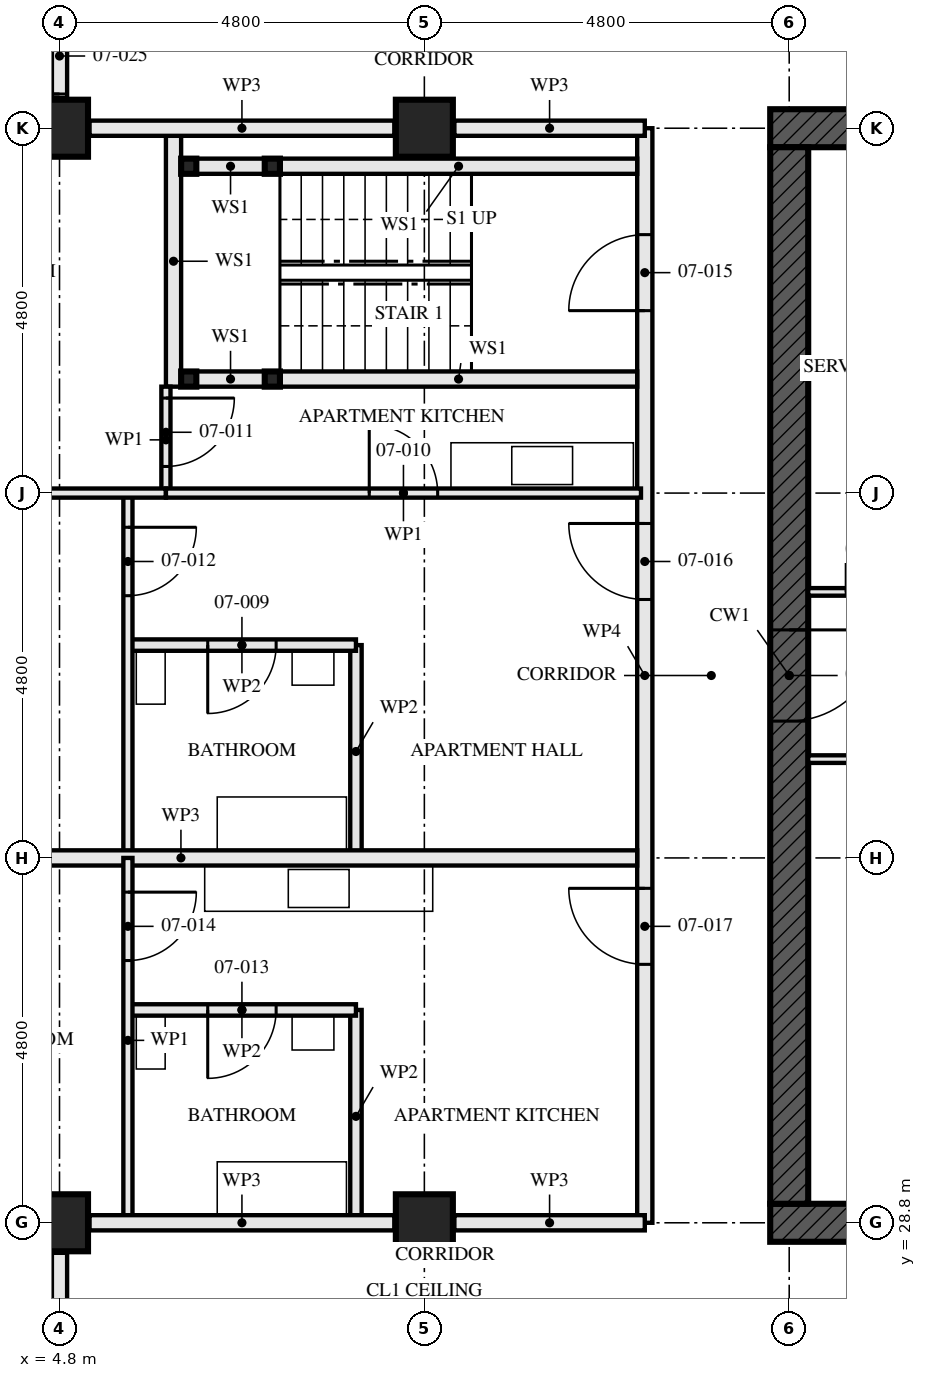
"""IFC4 building model, lengths in metres.
Left out: names, types, materials, properties, quantities, classifications, styles, units other than length and angle.
Written with IfcOpenShell. Run it as: python <this file> out.ifc"""

import sys

from ifc_helpers import new_model, si_unit, direction, frame, frame_2d, origin, origin_2d, place, context, subcontext, project, spatial, rectangle, hollow_rectangle, extrude, element, fill, save


model = new_model("IFC4")
c1 = context("Model", 3, precision=1e-05, world=origin(), true_north=direction((0.0, 1.0)))
c2 = subcontext(c1, "Body", "Model", "MODEL_VIEW")
j1 = project(units=[si_unit("LENGTHUNIT", "METRE"), si_unit("PLANEANGLEUNIT", "RADIAN")], contexts=[c1])
p1 = place(None, origin())
s1 = spatial("IfcSite", under=j1, at=p1, CompositionType="ELEMENT")
p2 = place(p1, origin())
s2 = spatial("IfcBuilding", under=s1, at=p2, CompositionType="ELEMENT")
p3 = place(p2, frame((0.0, 0.0, 30.5)))
s3 = spatial("IfcBuildingStorey", under=s2, at=p3, CompositionType="ELEMENT", Elevation=30.5)
for number, where, z_axis, x_axis in (
    (1, (4.8, 28.8, 0.0), (0.0, 0.0, 1.0), (0.0, 1.0, 0.0)),
    (2, (4.8, 43.2, 0.0), (0.0, 0.0, 1.0), (0.0, 1.0, 0.0)),
    (3, (9.6, 28.8, 0.0), (0.0, 0.0, 1.0), (0.0, 1.0, 0.0)),
    (4, (9.6, 43.2, 0.0), (0.0, 0.0, 1.0), (0.0, 1.0, 0.0)),
):
    element("IfcColumn", number, at=place(p3, frame(where, z_axis=z_axis, x_axis=x_axis)), inside=s3, PredefinedType="COLUMN", context=c2, shape_type="SweptSolid", body=[
        extrude(hollow_rectangle(XDim=0.75, YDim=0.75, WallThickness=0.08, at=origin_2d()), origin(), (0.0, 0.0, 1.0), 3.5),
    ])
p4 = place(p3, frame((14.15, 28.8, -0.17), z_axis=(0.0, 0.0, 1.0), x_axis=(1.0, 0.0, 0.0)))
e5 = element("IfcWall", 5, at=p4, inside=s3, PredefinedType="SHEAR", context=c2, shape_type="SweptSolid", body=[
    extrude(rectangle(XDim=14.9, YDim=0.5, at=frame_2d((7.45, 0.0))), origin(), (0.0, 0.0, 1.0), 3.5),
])
p5 = place(p4, frame((6.85, 0.0, 0.17)))
e6 = element("IfcOpeningElement", 6, at=p5, cuts=e5, PredefinedType="OPENING", context=c2, shape_type="SweptSolid", body=[
    extrude(rectangle(XDim=1.2, YDim=2.1, at=frame_2d((0.6, 1.05))), frame((0.0, 0.26, 0.0), z_axis=(0.0, -1.0, 0.0), x_axis=(1.0, 0.0, 0.0)), (0.0, 0.0, 1.0), 0.521),
])
p6 = place(p3, frame((29.05, 43.2, -0.17), z_axis=(0.0, 0.0, 1.0), x_axis=(-1.0, 0.0, 0.0)))
e7 = element("IfcWall", 7, at=p6, inside=s3, PredefinedType="SHEAR", context=c2, shape_type="SweptSolid", body=[
    extrude(rectangle(XDim=14.9, YDim=0.5, at=frame_2d((7.45, 0.0))), origin(), (0.0, 0.0, 1.0), 3.5),
])
p7 = place(p6, frame((6.85, 0.0, 0.17)))
e8 = element("IfcOpeningElement", 8, at=p7, cuts=e7, PredefinedType="OPENING", context=c2, shape_type="SweptSolid", body=[
    extrude(rectangle(XDim=1.2, YDim=2.1, at=frame_2d((0.6, 1.05))), frame((0.0, 0.26, 0.0), z_axis=(0.0, -1.0, 0.0), x_axis=(1.0, 0.0, 0.0)), (0.0, 0.0, 1.0), 0.521),
])
p8 = place(p3, frame((14.4, 42.95, -0.17), z_axis=(0.0, 0.0, 1.0), x_axis=(0.0, -1.0, 0.0)))
e9 = element("IfcWall", 9, at=p8, inside=s3, PredefinedType="SHEAR", context=c2, shape_type="SweptSolid", body=[
    extrude(rectangle(XDim=13.9, YDim=0.5, at=frame_2d((6.95, 0.0))), origin(), (0.0, 0.0, 1.0), 3.5),
])
p9 = place(p8, frame((6.35, 0.0, 0.17)))
e10 = element("IfcOpeningElement", 10, at=p9, cuts=e9, PredefinedType="OPENING", context=c2, shape_type="SweptSolid", body=[
    extrude(rectangle(XDim=1.2, YDim=2.1, at=frame_2d((0.6, 1.05))), frame((0.0, 0.26, 0.0), z_axis=(0.0, -1.0, 0.0), x_axis=(1.0, 0.0, 0.0)), (0.0, 0.0, 1.0), 0.521),
])
for number, where, z_axis, x_axis in (
    (11, (6.5, 42.7, 0.0), (0.0, 0.0, 1.0), (1.0, 0.0, 0.0)),
    (12, (6.5, 39.9, 0.0), (0.0, 0.0, 1.0), (1.0, 0.0, 0.0)),
    (13, (7.6, 42.7, 0.0), (0.0, 0.0, 1.0), (1.0, 0.0, 0.0)),
    (14, (7.6, 39.9, 0.0), (0.0, 0.0, 1.0), (1.0, 0.0, 0.0)),
):
    element("IfcColumn", number, at=place(p3, frame(where, z_axis=z_axis, x_axis=x_axis)), inside=s3, PredefinedType="COLUMN", context=c2, shape_type="SweptSolid", body=[
        extrude(hollow_rectangle(XDim=0.2, YDim=0.2, WallThickness=0.008, at=origin_2d()), origin(), (0.0, 0.0, 1.0), 3.33),
    ])
p10 = place(p3, frame((4.8, 26.8, 0.0), z_axis=(0.0, 0.0, 1.0), x_axis=(0.0, 1.0, 0.0)))
e15 = element("IfcWall", 15, at=p10, inside=s3, PredefinedType="PARTITIONING", context=c2, shape_type="SweptSolid", body=[
    extrude(rectangle(XDim=1.605, YDim=0.2, at=frame_2d((0.802, 0.0))), origin(), (0.0, 0.0, 1.0), 3.33),
])
p11 = place(p3, frame((6.6, 42.7, 0.0), z_axis=(0.0, 0.0, 1.0), x_axis=(1.0, 0.0, 0.0)))
e16 = element("IfcWall", 16, at=p11, inside=s3, PredefinedType="SOLIDWALL", context=c2, shape_type="SweptSolid", body=[
    extrude(rectangle(XDim=0.9, YDim=0.2, at=frame_2d((0.45, 0.0))), origin(), (0.0, 0.0, 1.0), 2.99),
])
p12 = place(p3, frame((7.7, 42.7, 0.0), z_axis=(0.0, 0.0, 1.0), x_axis=(1.0, 0.0, 0.0)))
e17 = element("IfcWall", 17, at=p12, inside=s3, PredefinedType="SOLIDWALL", context=c2, shape_type="SweptSolid", body=[
    extrude(rectangle(XDim=4.7, YDim=0.2, at=frame_2d((2.35, 0.0))), origin(), (0.0, 0.0, 1.0), 2.99),
])
p13 = place(p3, frame((6.6, 39.9, 0.0), z_axis=(0.0, 0.0, 1.0), x_axis=(1.0, 0.0, 0.0)))
e18 = element("IfcWall", 18, at=p13, inside=s3, PredefinedType="SOLIDWALL", context=c2, shape_type="SweptSolid", body=[
    extrude(rectangle(XDim=0.9, YDim=0.2, at=frame_2d((0.45, 0.0))), origin(), (0.0, 0.0, 1.0), 2.99),
])
p14 = place(p3, frame((7.7, 39.9, 0.0), z_axis=(0.0, 0.0, 1.0), x_axis=(1.0, 0.0, 0.0)))
e19 = element("IfcWall", 19, at=p14, inside=s3, PredefinedType="SOLIDWALL", context=c2, shape_type="SweptSolid", body=[
    extrude(rectangle(XDim=4.7, YDim=0.2, at=frame_2d((2.35, 0.0))), origin(), (0.0, 0.0, 1.0), 2.99),
])
p15 = place(p3, frame((6.3, 43.1, 0.0), z_axis=(0.0, 0.0, 1.0), x_axis=(0.0, -1.0, 0.0)))
e20 = element("IfcWall", 20, at=p15, inside=s3, PredefinedType="SOLIDWALL", context=c2, shape_type="SweptSolid", body=[
    extrude(rectangle(XDim=3.3, YDim=0.2, at=frame_2d((1.65, 0.0))), origin(), (0.0, 0.0, 1.0), 3.33),
])
p16 = place(p3, frame((5.7, 36.4, 0.0), z_axis=(0.0, 0.0, 1.0), x_axis=(1.0, 0.0, 0.0)))
e21 = element("IfcWall", 21, at=p16, inside=s3, PredefinedType="PARTITIONING", context=c2, shape_type="SweptSolid", body=[
    extrude(rectangle(XDim=3.0, YDim=0.15, at=frame_2d((1.5, 0.0))), origin(), (0.0, 0.0, 1.0), 3.33),
])
p17 = place(p16, frame((1.05, 0.0, 0.0)))
e22 = element("IfcOpeningElement", 22, at=p17, cuts=e21, PredefinedType="OPENING", context=c2, shape_type="SweptSolid", body=[
    extrude(rectangle(XDim=0.9, YDim=2.1, at=frame_2d((0.45, 1.05))), frame((0.0, 0.085, 0.0), z_axis=(0.0, -1.0, 0.0), x_axis=(1.0, 0.0, 0.0)), (0.0, 0.0, 1.0), 0.171),
])
p18 = place(p3, frame((8.7, 36.4, 0.0), z_axis=(0.0, 0.0, 1.0), x_axis=(0.0, -1.0, 0.0)))
e23 = element("IfcWall", 23, at=p18, inside=s3, PredefinedType="PARTITIONING", context=c2, shape_type="SweptSolid", body=[
    extrude(rectangle(XDim=2.8, YDim=0.15, at=frame_2d((1.4, 0.0))), origin(), (0.0, 0.0, 1.0), 3.33),
])
p19 = place(p3, frame((6.2, 38.4, 0.0), z_axis=(0.0, 0.0, 1.0), x_axis=(1.0, 0.0, 0.0)))
e24 = element("IfcWall", 24, at=p19, inside=s3, PredefinedType="PARTITIONING", context=c2, shape_type="SweptSolid", body=[
    extrude(rectangle(XDim=6.25, YDim=0.12, at=frame_2d((3.125, 0.0))), origin(), (0.0, 0.0, 1.0), 2.55),
])
p20 = place(p19, frame((2.675, 0.0, 0.0)))
e25 = element("IfcOpeningElement", 25, at=p20, cuts=e24, PredefinedType="OPENING", context=c2, shape_type="SweptSolid", body=[
    extrude(rectangle(XDim=0.9, YDim=2.1, at=frame_2d((0.45, 1.05))), frame((0.0, 0.071, 0.0), z_axis=(0.0, -1.0, 0.0), x_axis=(1.0, 0.0, 0.0)), (0.0, 0.0, 1.0), 0.141),
])
p21 = place(p3, frame((6.2, 39.8, 0.0), z_axis=(0.0, 0.0, 1.0), x_axis=(0.0, -1.0, 0.0)))
e26 = element("IfcWall", 26, at=p21, inside=s3, PredefinedType="PARTITIONING", context=c2, shape_type="SweptSolid", body=[
    extrude(rectangle(XDim=1.4, YDim=0.12, at=frame_2d((0.7, 0.0))), origin(), (0.0, 0.0, 1.0), 3.33),
])
p22 = place(p21, frame((0.15, 0.0, 0.0)))
e27 = element("IfcOpeningElement", 27, at=p22, cuts=e26, PredefinedType="OPENING", context=c2, shape_type="SweptSolid", body=[
    extrude(rectangle(XDim=0.9, YDim=2.1, at=frame_2d((0.45, 1.05))), frame((0.0, 0.071, 0.0), z_axis=(0.0, -1.0, 0.0), x_axis=(1.0, 0.0, 0.0)), (0.0, 0.0, 1.0), 0.141),
])
p23 = place(p3, frame((5.7, 38.4, 0.0), z_axis=(0.0, 0.0, 1.0), x_axis=(0.0, -1.0, 0.0)))
e28 = element("IfcWall", 28, at=p23, inside=s3, PredefinedType="PARTITIONING", context=c2, shape_type="SweptSolid", body=[
    extrude(rectangle(XDim=4.8, YDim=0.12, at=frame_2d((2.4, 0.0))), origin(), (0.0, 0.0, 1.0), 3.33),
])
p24 = place(p23, frame((0.45, 0.0, 0.0)))
e29 = element("IfcOpeningElement", 29, at=p24, cuts=e28, PredefinedType="OPENING", context=c2, shape_type="SweptSolid", body=[
    extrude(rectangle(XDim=0.9, YDim=2.1, at=frame_2d((0.45, 1.05))), frame((0.0, 0.071, 0.0), z_axis=(0.0, -1.0, 0.0), x_axis=(1.0, 0.0, 0.0)), (0.0, 0.0, 1.0), 0.141),
])
p25 = place(p3, frame((0.395, 38.4, 0.0), z_axis=(0.0, 0.0, 1.0), x_axis=(1.0, 0.0, 0.0)))
e30 = element("IfcWall", 30, at=p25, inside=s3, PredefinedType="PARTITIONING", context=c2, shape_type="SweptSolid", body=[
    extrude(rectangle(XDim=5.805, YDim=0.12, at=frame_2d((2.902, 0.0))), origin(), (0.0, 0.0, 1.0), 2.55),
])
p26 = place(p3, frame((0.395, 33.6, 0.0), z_axis=(0.0, 0.0, 1.0), x_axis=(1.0, 0.0, 0.0)))
e31 = element("IfcWall", 31, at=p26, inside=s3, PredefinedType="PARTITIONING", context=c2, shape_type="SweptSolid", body=[
    extrude(rectangle(XDim=12.005, YDim=0.2, at=frame_2d((6.002, 0.0))), origin(), (0.0, 0.0, 1.0), 2.55),
])
p27 = place(p3, frame((5.7, 31.6, 0.0), z_axis=(0.0, 0.0, 1.0), x_axis=(1.0, 0.0, 0.0)))
e32 = element("IfcWall", 32, at=p27, inside=s3, PredefinedType="PARTITIONING", context=c2, shape_type="SweptSolid", body=[
    extrude(rectangle(XDim=3.0, YDim=0.15, at=frame_2d((1.5, 0.0))), origin(), (0.0, 0.0, 1.0), 3.33),
])
p28 = place(p27, frame((1.05, 0.0, 0.0)))
e33 = element("IfcOpeningElement", 33, at=p28, cuts=e32, PredefinedType="OPENING", context=c2, shape_type="SweptSolid", body=[
    extrude(rectangle(XDim=0.9, YDim=2.1, at=frame_2d((0.45, 1.05))), frame((0.0, 0.085, 0.0), z_axis=(0.0, -1.0, 0.0), x_axis=(1.0, 0.0, 0.0)), (0.0, 0.0, 1.0), 0.171),
])
p29 = place(p3, frame((8.7, 31.6, 0.0), z_axis=(0.0, 0.0, 1.0), x_axis=(0.0, -1.0, 0.0)))
e34 = element("IfcWall", 34, at=p29, inside=s3, PredefinedType="PARTITIONING", context=c2, shape_type="SweptSolid", body=[
    extrude(rectangle(XDim=2.8, YDim=0.15, at=frame_2d((1.4, 0.0))), origin(), (0.0, 0.0, 1.0), 3.33),
])
p30 = place(p3, frame((5.7, 33.6, 0.0), z_axis=(0.0, 0.0, 1.0), x_axis=(0.0, -1.0, 0.0)))
e35 = element("IfcWall", 35, at=p30, inside=s3, PredefinedType="PARTITIONING", context=c2, shape_type="SweptSolid", body=[
    extrude(rectangle(XDim=4.8, YDim=0.12, at=frame_2d((2.4, 0.0))), origin(), (0.0, 0.0, 1.0), 3.33),
])
p31 = place(p30, frame((0.45, 0.0, 0.0)))
e36 = element("IfcOpeningElement", 36, at=p31, cuts=e35, PredefinedType="OPENING", context=c2, shape_type="SweptSolid", body=[
    extrude(rectangle(XDim=0.9, YDim=2.1, at=frame_2d((0.45, 1.05))), frame((0.0, 0.071, 0.0), z_axis=(0.0, -1.0, 0.0), x_axis=(1.0, 0.0, 0.0)), (0.0, 0.0, 1.0), 0.141),
])
p32 = place(p3, frame((12.5, 43.2, 0.0), z_axis=(0.0, 0.0, 1.0), x_axis=(0.0, -1.0, 0.0)))
e37 = element("IfcWall", 37, at=p32, inside=s3, PredefinedType="PARTITIONING", context=c2, shape_type="SweptSolid", body=[
    extrude(rectangle(XDim=14.4, YDim=0.2, at=frame_2d((7.2, 0.0))), origin(), (0.0, 0.0, 1.0), 2.55),
])
p33 = place(p32, frame((1.4, 0.0, 0.0)))
e38 = element("IfcOpeningElement", 38, at=p33, cuts=e37, PredefinedType="OPENING", context=c2, shape_type="SweptSolid", body=[
    extrude(rectangle(XDim=1.0, YDim=2.1, at=frame_2d((0.5, 1.05))), frame((0.0, 0.111, 0.0), z_axis=(0.0, -1.0, 0.0), x_axis=(1.0, 0.0, 0.0)), (0.0, 0.0, 1.0), 0.221),
])
p34 = place(p32, frame((5.2, 0.0, 0.0)))
e39 = element("IfcOpeningElement", 39, at=p34, cuts=e37, PredefinedType="OPENING", context=c2, shape_type="SweptSolid", body=[
    extrude(rectangle(XDim=1.0, YDim=2.1, at=frame_2d((0.5, 1.05))), frame((0.0, 0.111, 0.0), z_axis=(0.0, -1.0, 0.0), x_axis=(1.0, 0.0, 0.0)), (0.0, 0.0, 1.0), 0.221),
])
p35 = place(p32, frame((10.0, 0.0, 0.0)))
e40 = element("IfcOpeningElement", 40, at=p35, cuts=e37, PredefinedType="OPENING", context=c2, shape_type="SweptSolid", body=[
    extrude(rectangle(XDim=1.0, YDim=2.1, at=frame_2d((0.5, 1.05))), frame((0.0, 0.111, 0.0), z_axis=(0.0, -1.0, 0.0), x_axis=(1.0, 0.0, 0.0)), (0.0, 0.0, 1.0), 0.221),
])
p36 = place(p3, frame((4.8, 45.2, 0.0), z_axis=(0.0, 0.0, 1.0), x_axis=(0.0, -1.0, 0.0)))
e41 = element("IfcWall", 41, at=p36, inside=s3, PredefinedType="PARTITIONING", context=c2, shape_type="SweptSolid", body=[
    extrude(rectangle(XDim=1.605, YDim=0.2, at=frame_2d((0.802, 0.0))), origin(), (0.0, 0.0, 1.0), 3.33),
])
p37 = place(p36, frame((0.55, 0.0, 0.0)))
e42 = element("IfcOpeningElement", 42, at=p37, cuts=e41, PredefinedType="OPENING", context=c2, shape_type="SweptSolid", body=[
    extrude(rectangle(XDim=1.0, YDim=2.1, at=frame_2d((0.5, 1.05))), frame((0.0, 0.111, 0.0), z_axis=(0.0, -1.0, 0.0), x_axis=(1.0, 0.0, 0.0)), (0.0, 0.0, 1.0), 0.221),
])
p38 = place(p3, frame((14.65, 34.9, 0.0), z_axis=(0.0, 0.0, 1.0), x_axis=(1.0, 0.0, 0.0)))
e43 = element("IfcWall", 43, at=p38, inside=s3, PredefinedType="SOLIDWALL", context=c2, shape_type="SweptSolid", body=[
    extrude(rectangle(XDim=5.9, YDim=0.1, at=frame_2d((2.95, 0.0))), origin(), (0.0, 0.0, 1.0), 3.33),
])
p39 = place(p38, frame((1.6, 0.0, 0.0)))
e44 = element("IfcOpeningElement", 44, at=p39, cuts=e43, PredefinedType="OPENING", context=c2, shape_type="SweptSolid", body=[
    extrude(rectangle(XDim=0.7, YDim=2.1, at=frame_2d((0.35, 1.05))), frame((0.0, 0.061, 0.0), z_axis=(0.0, -1.0, 0.0), x_axis=(1.0, 0.0, 0.0)), (0.0, 0.0, 1.0), 0.121),
])
p40 = place(p3, frame((14.65, 37.1, 0.0), z_axis=(0.0, 0.0, 1.0), x_axis=(1.0, 0.0, 0.0)))
e45 = element("IfcWall", 45, at=p40, inside=s3, PredefinedType="SOLIDWALL", context=c2, shape_type="SweptSolid", body=[
    extrude(rectangle(XDim=5.9, YDim=0.1, at=frame_2d((2.95, 0.0))), origin(), (0.0, 0.0, 1.0), 3.33),
])
p41 = place(p40, frame((0.5, 0.0, 0.0)))
e46 = element("IfcOpeningElement", 46, at=p41, cuts=e45, PredefinedType="OPENING", context=c2, shape_type="SweptSolid", body=[
    extrude(rectangle(XDim=0.7, YDim=2.1, at=frame_2d((0.35, 1.05))), frame((0.0, 0.061, 0.0), z_axis=(0.0, -1.0, 0.0), x_axis=(1.0, 0.0, 0.0)), (0.0, 0.0, 1.0), 0.121),
])
p42 = place(p40, frame((1.85, 0.0, 0.0)))
e47 = element("IfcOpeningElement", 47, at=p42, cuts=e45, PredefinedType="OPENING", context=c2, shape_type="SweptSolid", body=[
    extrude(rectangle(XDim=0.9, YDim=2.1, at=frame_2d((0.45, 1.05))), frame((0.0, 0.061, 0.0), z_axis=(0.0, -1.0, 0.0), x_axis=(1.0, 0.0, 0.0)), (0.0, 0.0, 1.0), 0.121),
])
p43 = place(p3, frame((12.5, 28.8, 0.0), z_axis=(0.0, 0.0, 1.0), x_axis=(-1.0, 0.0, 0.0)))
e48 = element("IfcWall", 48, at=p43, inside=s3, PredefinedType="PARTITIONING", context=c2, shape_type="SweptSolid", body=[
    extrude(rectangle(XDim=2.505, YDim=0.2, at=frame_2d((1.252, 0.0))), origin(), (0.0, 0.0, 1.0), 2.32),
])
p44 = place(p3, frame((9.205, 28.8, 0.0), z_axis=(0.0, 0.0, 1.0), x_axis=(-1.0, 0.0, 0.0)))
e49 = element("IfcWall", 49, at=p44, inside=s3, PredefinedType="PARTITIONING", context=c2, shape_type="SweptSolid", body=[
    extrude(rectangle(XDim=4.01, YDim=0.2, at=frame_2d((2.005, 0.0))), origin(), (0.0, 0.0, 1.0), 2.32),
])
p45 = place(p3, frame((12.5, 43.2, 0.0), z_axis=(0.0, 0.0, 1.0), x_axis=(-1.0, 0.0, 0.0)))
e50 = element("IfcWall", 50, at=p45, inside=s3, PredefinedType="PARTITIONING", context=c2, shape_type="SweptSolid", body=[
    extrude(rectangle(XDim=2.505, YDim=0.2, at=frame_2d((1.252, 0.0))), origin(), (0.0, 0.0, 1.0), 2.32),
])
p46 = place(p3, frame((9.205, 43.2, 0.0), z_axis=(0.0, 0.0, 1.0), x_axis=(-1.0, 0.0, 0.0)))
e51 = element("IfcWall", 51, at=p46, inside=s3, PredefinedType="PARTITIONING", context=c2, shape_type="SweptSolid", body=[
    extrude(rectangle(XDim=4.01, YDim=0.2, at=frame_2d((2.005, 0.0))), origin(), (0.0, 0.0, 1.0), 2.32),
])
p47 = place(p17, frame((0.9, 0.0, 0.0), z_axis=(0.0, 0.0, 1.0), x_axis=(-1.0, 0.0, 0.0)))
e52 = element("IfcDoor", 52, at=p47, inside=s3, OperationType="SINGLE_SWING_LEFT", PredefinedType="DOOR", context=c2, shape_type="SweptSolid", body=[
    extrude(rectangle(XDim=0.9, YDim=2.1, at=frame_2d((0.45, 1.05))), frame((0.0, 0.022, 0.0), z_axis=(0.0, -1.0, 0.0), x_axis=(1.0, 0.0, 0.0)), (0.0, 0.0, 1.0), 0.044),
])
fill(e22, e52)
p48 = place(p20, origin())
e53 = element("IfcDoor", 53, at=p48, inside=s3, OperationType="SINGLE_SWING_RIGHT", PredefinedType="DOOR", context=c2, shape_type="SweptSolid", body=[
    extrude(rectangle(XDim=0.9, YDim=2.1, at=frame_2d((0.45, 1.05))), frame((0.0, 0.022, 0.0), z_axis=(0.0, -1.0, 0.0), x_axis=(1.0, 0.0, 0.0)), (0.0, 0.0, 1.0), 0.044),
])
fill(e25, e53)
p49 = place(p22, origin())
e54 = element("IfcDoor", 54, at=p49, inside=s3, OperationType="SINGLE_SWING_RIGHT", PredefinedType="DOOR", context=c2, shape_type="SweptSolid", body=[
    extrude(rectangle(XDim=0.9, YDim=2.1, at=frame_2d((0.45, 1.05))), frame((0.0, 0.022, 0.0), z_axis=(0.0, -1.0, 0.0), x_axis=(1.0, 0.0, 0.0)), (0.0, 0.0, 1.0), 0.044),
])
fill(e27, e54)
p50 = place(p24, origin())
e55 = element("IfcDoor", 55, at=p50, inside=s3, OperationType="SINGLE_SWING_RIGHT", PredefinedType="DOOR", context=c2, shape_type="SweptSolid", body=[
    extrude(rectangle(XDim=0.9, YDim=2.1, at=frame_2d((0.45, 1.05))), frame((0.0, 0.022, 0.0), z_axis=(0.0, -1.0, 0.0), x_axis=(1.0, 0.0, 0.0)), (0.0, 0.0, 1.0), 0.044),
])
fill(e29, e55)
p51 = place(p28, frame((0.9, 0.0, 0.0), z_axis=(0.0, 0.0, 1.0), x_axis=(-1.0, 0.0, 0.0)))
e56 = element("IfcDoor", 56, at=p51, inside=s3, OperationType="SINGLE_SWING_LEFT", PredefinedType="DOOR", context=c2, shape_type="SweptSolid", body=[
    extrude(rectangle(XDim=0.9, YDim=2.1, at=frame_2d((0.45, 1.05))), frame((0.0, 0.022, 0.0), z_axis=(0.0, -1.0, 0.0), x_axis=(1.0, 0.0, 0.0)), (0.0, 0.0, 1.0), 0.044),
])
fill(e33, e56)
p52 = place(p31, origin())
e57 = element("IfcDoor", 57, at=p52, inside=s3, OperationType="SINGLE_SWING_RIGHT", PredefinedType="DOOR", context=c2, shape_type="SweptSolid", body=[
    extrude(rectangle(XDim=0.9, YDim=2.1, at=frame_2d((0.45, 1.05))), frame((0.0, 0.022, 0.0), z_axis=(0.0, -1.0, 0.0), x_axis=(1.0, 0.0, 0.0)), (0.0, 0.0, 1.0), 0.044),
])
fill(e36, e57)
p53 = place(p33, frame((1.0, 0.0, 0.0), z_axis=(0.0, 0.0, 1.0), x_axis=(-1.0, 0.0, 0.0)))
e58 = element("IfcDoor", 58, at=p53, inside=s3, OperationType="SINGLE_SWING_RIGHT", PredefinedType="DOOR", context=c2, shape_type="SweptSolid", body=[
    extrude(rectangle(XDim=1.0, YDim=2.1, at=frame_2d((0.5, 1.05))), frame((0.0, 0.032, 0.0), z_axis=(0.0, -1.0, 0.0), x_axis=(1.0, 0.0, 0.0)), (0.0, 0.0, 1.0), 0.064),
])
fill(e38, e58)
p54 = place(p34, frame((1.0, 0.0, 0.0), z_axis=(0.0, 0.0, 1.0), x_axis=(-1.0, 0.0, 0.0)))
e59 = element("IfcDoor", 59, at=p54, inside=s3, OperationType="SINGLE_SWING_LEFT", PredefinedType="DOOR", context=c2, shape_type="SweptSolid", body=[
    extrude(rectangle(XDim=1.0, YDim=2.1, at=frame_2d((0.5, 1.05))), frame((0.0, 0.027, 0.0), z_axis=(0.0, -1.0, 0.0), x_axis=(1.0, 0.0, 0.0)), (0.0, 0.0, 1.0), 0.054),
])
fill(e39, e59)
p55 = place(p35, frame((1.0, 0.0, 0.0), z_axis=(0.0, 0.0, 1.0), x_axis=(-1.0, 0.0, 0.0)))
e60 = element("IfcDoor", 60, at=p55, inside=s3, OperationType="SINGLE_SWING_LEFT", PredefinedType="DOOR", context=c2, shape_type="SweptSolid", body=[
    extrude(rectangle(XDim=1.0, YDim=2.1, at=frame_2d((0.5, 1.05))), frame((0.0, 0.027, 0.0), z_axis=(0.0, -1.0, 0.0), x_axis=(1.0, 0.0, 0.0)), (0.0, 0.0, 1.0), 0.054),
])
fill(e40, e60)
p56 = place(p37, frame((1.0, 0.0, 0.0), z_axis=(0.0, 0.0, 1.0), x_axis=(-1.0, 0.0, 0.0)))
e61 = element("IfcDoor", 61, at=p56, inside=s3, OperationType="SINGLE_SWING_RIGHT", PredefinedType="DOOR", context=c2, shape_type="SweptSolid", body=[
    extrude(rectangle(XDim=1.0, YDim=2.1, at=frame_2d((0.5, 1.05))), frame((0.0, 0.027, 0.0), z_axis=(0.0, -1.0, 0.0), x_axis=(1.0, 0.0, 0.0)), (0.0, 0.0, 1.0), 0.054),
])
fill(e42, e61)
p57 = place(p9, origin())
e62 = element("IfcDoor", 62, at=p57, inside=s3, OperationType="SINGLE_SWING_LEFT", PredefinedType="DOOR", context=c2, shape_type="SweptSolid", body=[
    extrude(rectangle(XDim=1.2, YDim=2.1, at=frame_2d((0.6, 1.05))), frame((0.0, 0.027, 0.0), z_axis=(0.0, -1.0, 0.0), x_axis=(1.0, 0.0, 0.0)), (0.0, 0.0, 1.0), 0.054),
])
fill(e10, e62)
save(model, sys.argv[1])
